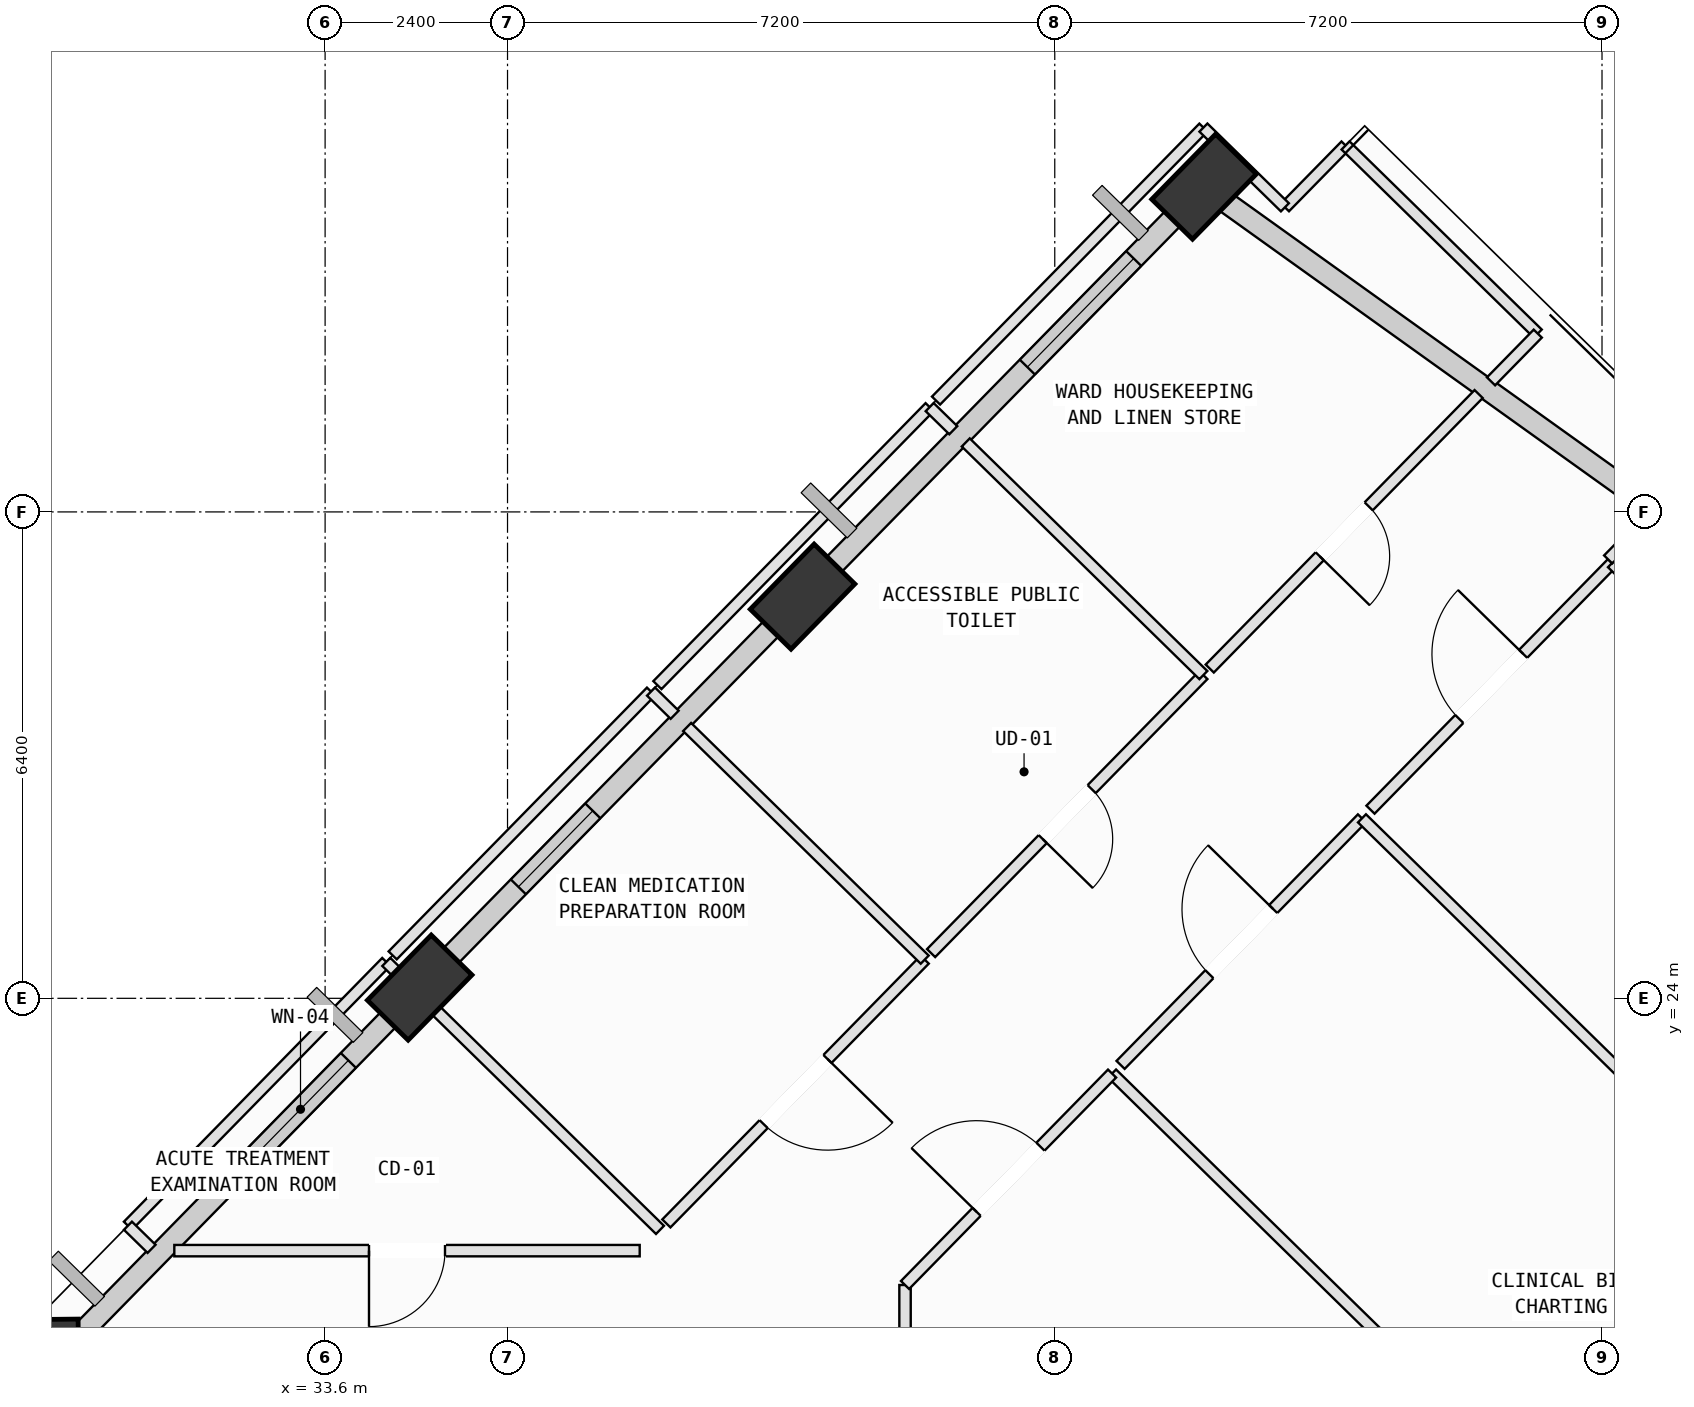
"""IFC4 building model, lengths in metres.
Left out: names, types, materials, properties, quantities, classifications, styles, units other than length and angle.
Written with IfcOpenShell. Run it as: python <this file> out.ifc"""

import sys

from ifc_helpers import new_model, si_unit, direction, frame, frame_2d, origin, origin_2d, place, context, subcontext, project, spatial, rectangle, extrude, element, fill, save


model = new_model("IFC4")
c1 = context("Model", 3, precision=1e-05, world=origin(), true_north=direction((0.0, 1.0)))
c2 = subcontext(c1, "Body", "Model", "MODEL_VIEW")
j1 = project(units=[si_unit("LENGTHUNIT", "METRE"), si_unit("PLANEANGLEUNIT", "RADIAN")], contexts=[c1])
p1 = place(None, origin())
s1 = spatial("IfcSite", under=j1, at=p1, CompositionType="ELEMENT")
p2 = place(p1, origin())
s2 = spatial("IfcBuilding", under=s1, at=p2, CompositionType="ELEMENT")
p3 = place(p2, frame((0.0, 0.0, 219.2)))
s3 = spatial("IfcBuildingStorey", under=s2, at=p3, CompositionType="ELEMENT", Elevation=219.2)
p4 = place(p3, frame((45.164, 34.68, 0.002), z_axis=(-0.041276583012, 0.047556476735, 0.998015343176), x_axis=(-0.060997101317, -0.997123434669, 0.044991217634)))
e1 = element("IfcColumn", 1, at=p4, inside=s3, PredefinedType="COLUMN", context=c2, shape_type="SweptSolid", body=[
    extrude(rectangle(XDim=1.2, YDim=0.75, at=origin_2d()), origin(), (0.0, 0.0, 1.0), 4.004),
])
p5 = place(p3, frame((39.882, 29.285, 0.002), z_axis=(-0.018745380702, 0.025889385725, 0.999489044667), x_axis=(-0.147908439225, -0.988737361944, 0.022836871563)))
e2 = element("IfcColumn", 2, at=p5, inside=s3, PredefinedType="COLUMN", context=c2, shape_type="SweptSolid", body=[
    extrude(rectangle(XDim=1.2, YDim=0.75, at=origin_2d()), origin(), (0.0, 0.0, 1.0), 3.998),
])
p6 = place(p3, frame((34.844, 24.141, 0.002), z_axis=(0.002687962717, 0.005131565187, 0.999983220807), x_axis=(-0.951298609313, -0.30824312721, 0.004138894343)))
e3 = element("IfcColumn", 3, at=p6, inside=s3, PredefinedType="COLUMN", context=c2, shape_type="SweptSolid", body=[
    extrude(rectangle(XDim=1.2, YDim=0.75, at=origin_2d()), origin(), (0.0, 0.0, 1.0), 3.996),
])
p7 = place(p3, frame((29.982, 19.176, 0.002), z_axis=(0.023449963828, -0.014778362621, 0.999615775783), x_axis=(-0.851223767602, 0.524070492315, 0.027716719769)))
e4 = element("IfcColumn", 4, at=p7, inside=s3, PredefinedType="COLUMN", context=c2, shape_type="SweptSolid", body=[
    extrude(rectangle(XDim=1.2, YDim=0.75, at=origin_2d()), origin(), (0.0, 0.0, 1.0), 3.998),
])
p8 = place(p3, frame((45.387, 34.52, 0.0), z_axis=(0.0, 0.0, 1.0), x_axis=(0.812998955019, -0.582265145048, 0.0)))
e5 = element("IfcWall", 5, at=p8, inside=s3, PredefinedType="SOLIDWALL", context=c2, shape_type="SweptSolid", body=[
    extrude(rectangle(XDim=9.036, YDim=0.28, at=frame_2d((4.518, 0.0))), origin(), (0.0, 0.0, 1.0), 3.265),
])
p9 = place(p3, frame((40.164, 29.573, 0.0), z_axis=(0.0, 0.0, 1.0), x_axis=(0.699668069964, 0.714468048181, 0.0)))
e6 = element("IfcWall", 6, at=p9, inside=s3, PredefinedType="SOLIDWALL", context=c2, shape_type="SweptSolid", body=[
    extrude(rectangle(XDim=6.78, YDim=0.28, at=frame_2d((3.39, 0.0))), origin(), (0.0, 0.0, 1.0), 3.165),
])
p10 = place(p9, frame((3.824, 0.0, 0.75)))
e7 = element("IfcOpeningElement", 7, at=p10, cuts=e6, PredefinedType="OPENING", context=c2, shape_type="SweptSolid", body=[
    extrude(rectangle(XDim=2.0, YDim=1.95, at=frame_2d((1.0, 0.975))), frame((0.0, 0.15, 0.0), z_axis=(0.0, -1.0, 0.0), x_axis=(1.0, 0.0, 0.0)), (0.0, 0.0, 1.0), 0.3),
])
p11 = place(p3, frame((35.13, 24.433, 0.0), z_axis=(0.0, 0.0, 1.0), x_axis=(0.699640187186, 0.714495352311, 0.0)))
e8 = element("IfcWall", 8, at=p11, inside=s3, PredefinedType="SOLIDWALL", context=c2, shape_type="SweptSolid", body=[
    extrude(rectangle(XDim=6.409, YDim=0.28, at=frame_2d((3.205, 0.0))), origin(), (0.0, 0.0, 1.0), 3.265),
])
p12 = place(p11, frame((1.447, 0.0, 0.75)))
e9 = element("IfcOpeningElement", 9, at=p12, cuts=e8, PredefinedType="OPENING", context=c2, shape_type="SweptSolid", body=[
    extrude(rectangle(XDim=1.4, YDim=1.85, at=frame_2d((0.7, 0.925))), frame((0.0, 0.15, 0.0), z_axis=(0.0, -1.0, 0.0), x_axis=(1.0, 0.0, 0.0)), (0.0, 0.0, 1.0), 0.3),
])
p13 = place(p3, frame((30.265, 19.465, 0.0), z_axis=(0.0, 0.0, 1.0), x_axis=(0.699674545586, 0.714461706643, 0.0)))
e10 = element("IfcWall", 10, at=p13, inside=s3, PredefinedType="SOLIDWALL", context=c2, shape_type="SweptSolid", body=[
    extrude(rectangle(XDim=6.158, YDim=0.28, at=frame_2d((3.079, 0.0))), origin(), (0.0, 0.0, 1.0), 3.165),
])
p14 = place(p13, frame((3.403, 0.0, 0.75)))
e11 = element("IfcOpeningElement", 11, at=p14, cuts=e10, PredefinedType="OPENING", context=c2, shape_type="SweptSolid", body=[
    extrude(rectangle(XDim=1.8, YDim=2.05, at=frame_2d((0.9, 1.025))), frame((0.0, 0.15, 0.0), z_axis=(0.0, -1.0, 0.0), x_axis=(1.0, 0.0, 0.0)), (0.0, 0.0, 1.0), 0.3),
])
p15 = place(p3, frame((43.954, 23.01, 0.0), z_axis=(0.0, 0.0, 1.0), x_axis=(0.714437262996, -0.699699504961, 0.0)))
e12 = element("IfcWall", 12, at=p15, inside=s3, PredefinedType="PARTITIONING", context=c2, shape_type="SweptSolid", body=[
    extrude(rectangle(XDim=13.484, YDim=0.15, at=frame_2d((6.742, 0.0))), origin(), (0.0, 0.0, 1.0), 3.415),
])
p16 = place(p3, frame((41.23, 19.274, 0.0), z_axis=(0.0, 0.0, 1.0), x_axis=(0.0, 1.0, 0.0)))
e13 = element("IfcWall", 13, at=p16, inside=s3, PredefinedType="PARTITIONING", context=c2, shape_type="SweptSolid", body=[
    extrude(rectangle(XDim=0.954, YDim=0.15, at=frame_2d((0.477, 0.0))), origin(), (0.0, 0.0, 1.0), 3.78),
])
p17 = place(p3, frame((41.23, 20.228, 0.0), z_axis=(0.0, 0.0, 1.0), x_axis=(0.699637463653, 0.714498019209, 0.0)))
e14 = element("IfcWall", 14, at=p17, inside=s3, PredefinedType="PARTITIONING", context=c2, shape_type="SweptSolid", body=[
    extrude(rectangle(XDim=3.894, YDim=0.15, at=frame_2d((1.947, 0.0))), origin(), (0.0, 0.0, 1.0), 3.78),
])
p18 = place(p17, frame((1.347, 0.0, 0.0)))
e15 = element("IfcOpeningElement", 15, at=p18, cuts=e14, PredefinedType="OPENING", context=c2, shape_type="SweptSolid", body=[
    extrude(rectangle(XDim=1.2, YDim=2.15, at=frame_2d((0.6, 1.075))), frame((0.0, 0.085, 0.0), z_axis=(0.0, -1.0, 0.0), x_axis=(1.0, 0.0, 0.0)), (0.0, 0.0, 1.0), 0.17),
])
p19 = place(p3, frame((44.066, 23.124, 0.0), z_axis=(0.0, 0.0, 1.0), x_axis=(0.699592189313, 0.714542349097, 0.0)))
e16 = element("IfcWall", 16, at=p19, inside=s3, PredefinedType="PARTITIONING", context=c2, shape_type="SweptSolid", body=[
    extrude(rectangle(XDim=4.54, YDim=0.15, at=frame_2d((2.27, 0.0))), origin(), (0.0, 0.0, 1.0), 3.78),
])
p20 = place(p19, frame((1.67, 0.0, 0.0)))
e17 = element("IfcOpeningElement", 17, at=p20, cuts=e16, PredefinedType="OPENING", context=c2, shape_type="SweptSolid", body=[
    extrude(rectangle(XDim=1.2, YDim=2.15, at=frame_2d((0.6, 1.075))), frame((0.0, 0.085, 0.0), z_axis=(0.0, -1.0, 0.0), x_axis=(1.0, 0.0, 0.0)), (0.0, 0.0, 1.0), 0.17),
])
p21 = place(p3, frame((47.242, 26.368, 0.0), z_axis=(0.0, 0.0, 1.0), x_axis=(0.714409925355, -0.699727417323, 0.0)))
e18 = element("IfcWall", 18, at=p21, inside=s3, PredefinedType="PARTITIONING", context=c2, shape_type="SweptSolid", body=[
    extrude(rectangle(XDim=13.485, YDim=0.15, at=frame_2d((6.743, 0.0))), origin(), (0.0, 0.0, 1.0), 3.78),
])
p22 = place(p3, frame((47.354, 26.482, 0.0), z_axis=(0.0, 0.0, 1.0), x_axis=(0.699675115153, 0.714461148863, 0.0)))
e19 = element("IfcWall", 19, at=p22, inside=s3, PredefinedType="PARTITIONING", context=c2, shape_type="SweptSolid", body=[
    extrude(rectangle(XDim=4.541, YDim=0.15, at=frame_2d((2.271, 0.0))), origin(), (0.0, 0.0, 1.0), 3.78),
])
p23 = place(p22, frame((1.67, 0.0, 0.0)))
e20 = element("IfcOpeningElement", 20, at=p23, cuts=e19, PredefinedType="OPENING", context=c2, shape_type="SweptSolid", body=[
    extrude(rectangle(XDim=1.2, YDim=2.15, at=frame_2d((0.6, 1.075))), frame((0.0, 0.085, 0.0), z_axis=(0.0, -1.0, 0.0), x_axis=(1.0, 0.0, 0.0)), (0.0, 0.0, 1.0), 0.17),
])
p24 = place(p3, frame((50.531, 29.726, 0.0), z_axis=(0.0, 0.0, 1.0), x_axis=(0.714431068807, -0.699705829563, 0.0)))
e21 = element("IfcWall", 21, at=p24, inside=s3, PredefinedType="PARTITIONING", context=c2, shape_type="SweptSolid", body=[
    extrude(rectangle(XDim=10.926, YDim=0.15, at=frame_2d((5.463, 0.0))), origin(), (0.0, 0.0, 1.0), 3.78),
])
p25 = place(p3, frame((31.006, 21.008, 0.0), z_axis=(0.0, 0.0, 1.0), x_axis=(0.699655259221, 0.71448059333, 0.0)))
e22 = element("IfcWall", 22, at=p25, inside=s3, PredefinedType="PARTITIONING", context=c2, shape_type="SweptSolid", body=[
    extrude(rectangle(XDim=4.858, YDim=0.15, at=frame_2d((2.429, 0.0))), origin(), (0.0, 0.0, 1.0), 3.78),
])
p26 = place(p3, frame((34.405, 24.479, 0.0), z_axis=(0.0, 0.0, 1.0), x_axis=(0.714503363724, -0.699632005577, 0.0)))
e23 = element("IfcWall", 23, at=p26, inside=s3, PredefinedType="PARTITIONING", context=c2, shape_type="SweptSolid", body=[
    extrude(rectangle(XDim=5.04, YDim=0.15, at=frame_2d((2.52, 0.0))), origin(), (0.0, 0.0, 1.0), 3.78),
])
p27 = place(p3, frame((37.739, 20.68, 0.0), z_axis=(0.0, 0.0, 1.0), x_axis=(-1.0, 0.0, 0.0)))
e24 = element("IfcWall", 24, at=p27, inside=s3, PredefinedType="PARTITIONING", context=c2, shape_type="SweptSolid", body=[
    extrude(rectangle(XDim=6.123, YDim=0.15, at=frame_2d((3.062, 0.0))), origin(), (0.0, 0.0, 1.0), 3.78),
])
p28 = place(p27, frame((2.562, 0.0, 0.0)))
e25 = element("IfcOpeningElement", 25, at=p28, cuts=e24, PredefinedType="OPENING", context=c2, shape_type="SweptSolid", body=[
    extrude(rectangle(XDim=1.0, YDim=2.12, at=frame_2d((0.5, 1.06))), frame((0.0, 0.085, 0.0), z_axis=(0.0, -1.0, 0.0), x_axis=(1.0, 0.0, 0.0)), (0.0, 0.0, 1.0), 0.17),
])
p29 = place(p3, frame((31.317, 20.704, 0.0), z_axis=(0.0, 0.0, 1.0), x_axis=(-0.714925563688, 0.699200570928, 0.0)))
e26 = element("IfcWall", 26, at=p29, inside=s3, PredefinedType="PARTITIONING", context=c2, shape_type="SweptSolid", body=[
    extrude(rectangle(XDim=0.435, YDim=0.15, at=frame_2d((0.217, 0.0))), origin(), (0.0, 0.0, 1.0), 3.78),
])
p30 = place(p3, frame((41.489, 24.509, 0.0), z_axis=(0.0, 0.0, 1.0), x_axis=(-0.699655259221, -0.71448059333, 0.0)))
e27 = element("IfcWall", 27, at=p30, inside=s3, PredefinedType="PARTITIONING", context=c2, shape_type="SweptSolid", body=[
    extrude(rectangle(XDim=4.858, YDim=0.15, at=frame_2d((2.429, 0.0))), origin(), (0.0, 0.0, 1.0), 3.165),
])
p31 = place(p30, frame((1.829, 0.0, 0.0)))
e28 = element("IfcOpeningElement", 28, at=p31, cuts=e27, PredefinedType="OPENING", context=c2, shape_type="SweptSolid", body=[
    extrude(rectangle(XDim=1.2, YDim=2.15, at=frame_2d((0.6, 1.075))), frame((0.0, 0.085, 0.0), z_axis=(0.0, -1.0, 0.0), x_axis=(1.0, 0.0, 0.0)), (0.0, 0.0, 1.0), 0.17),
])
p32 = place(p3, frame((34.489, 24.565, 0.0), z_axis=(0.0, 0.0, 1.0), x_axis=(0.699655259221, 0.71448059333, 0.0)))
e29 = element("IfcWall", 29, at=p32, inside=s3, PredefinedType="PARTITIONING", context=c2, shape_type="SweptSolid", body=[
    extrude(rectangle(XDim=4.858, YDim=0.15, at=frame_2d((2.429, 0.0))), origin(), (0.0, 0.0, 1.0), 3.78),
])
p33 = place(p3, frame((37.888, 28.036, 0.0), z_axis=(0.0, 0.0, 1.0), x_axis=(0.714078333154, -0.700065806993, 0.0)))
e30 = element("IfcWall", 30, at=p33, inside=s3, PredefinedType="PARTITIONING", context=c2, shape_type="SweptSolid", body=[
    extrude(rectangle(XDim=0.436, YDim=0.15, at=frame_2d((0.218, 0.0))), origin(), (0.0, 0.0, 1.0), 3.78),
])
p34 = place(p3, frame((38.363, 27.57, 0.0), z_axis=(0.0, 0.0, 1.0), x_axis=(0.71448950504, -0.69964615856, 0.0)))
e31 = element("IfcWall", 31, at=p34, inside=s3, PredefinedType="PARTITIONING", context=c2, shape_type="SweptSolid", body=[
    extrude(rectangle(XDim=4.375, YDim=0.15, at=frame_2d((2.188, 0.0))), origin(), (0.0, 0.0, 1.0), 3.415),
])
p35 = place(p3, frame((45.155, 28.253, 0.0), z_axis=(0.0, 0.0, 1.0), x_axis=(-0.699652687423, -0.714483111754, 0.0)))
e32 = element("IfcWall", 32, at=p35, inside=s3, PredefinedType="PARTITIONING", context=c2, shape_type="SweptSolid", body=[
    extrude(rectangle(XDim=5.12, YDim=0.15, at=frame_2d((2.56, 0.0))), origin(), (0.0, 0.0, 1.0), 3.78),
])
p36 = place(p35, frame((2.1, 0.0, 0.0)))
e33 = element("IfcOpeningElement", 33, at=p36, cuts=e32, PredefinedType="OPENING", context=c2, shape_type="SweptSolid", body=[
    extrude(rectangle(XDim=0.92, YDim=2.1, at=frame_2d((0.46, 1.05))), frame((0.0, 0.085, 0.0), z_axis=(0.0, -1.0, 0.0), x_axis=(1.0, 0.0, 0.0)), (0.0, 0.0, 1.0), 0.17),
])
p37 = place(p3, frame((37.972, 28.121, 0.0), z_axis=(0.0, 0.0, 1.0), x_axis=(0.699652687423, 0.714483111754, 0.0)))
e34 = element("IfcWall", 34, at=p37, inside=s3, PredefinedType="PARTITIONING", context=c2, shape_type="SweptSolid", body=[
    extrude(rectangle(XDim=5.12, YDim=0.15, at=frame_2d((2.56, 0.0))), origin(), (0.0, 0.0, 1.0), 3.265),
])
p38 = place(p3, frame((41.554, 31.779, 0.0), z_axis=(0.0, 0.0, 1.0), x_axis=(0.71519995758, -0.698919895751, 0.0)))
e35 = element("IfcWall", 35, at=p38, inside=s3, PredefinedType="PARTITIONING", context=c2, shape_type="SweptSolid", body=[
    extrude(rectangle(XDim=0.435, YDim=0.15, at=frame_2d((0.217, 0.0))), origin(), (0.0, 0.0, 1.0), 3.78),
])
p39 = place(p3, frame((42.029, 31.314, 0.0), z_axis=(0.0, 0.0, 1.0), x_axis=(0.71448950504, -0.69964615856, 0.0)))
e36 = element("IfcWall", 36, at=p39, inside=s3, PredefinedType="PARTITIONING", context=c2, shape_type="SweptSolid", body=[
    extrude(rectangle(XDim=4.375, YDim=0.15, at=frame_2d((2.188, 0.0))), origin(), (0.0, 0.0, 1.0), 3.78),
])
p40 = place(p3, frame((46.228, 34.408, 0.0), z_axis=(0.0, 0.0, 1.0), x_axis=(0.700002877406, 0.714140022421, 0.0)))
e37 = element("IfcWall", 37, at=p40, inside=s3, PredefinedType="PARTITIONING", context=c2, shape_type="SweptSolid", body=[
    extrude(rectangle(XDim=1.14, YDim=0.15, at=frame_2d((0.57, 0.0))), origin(), (0.0, 0.0, 1.0), 3.78),
])
p41 = place(p3, frame((47.026, 35.222, 0.0), z_axis=(0.0, 0.0, 1.0), x_axis=(0.714585854824, -0.699547751112, 0.0)))
e38 = element("IfcWall", 38, at=p41, inside=s3, PredefinedType="PARTITIONING", context=c2, shape_type="SweptSolid", body=[
    extrude(rectangle(XDim=3.539, YDim=0.15, at=frame_2d((1.77, 0.0))), origin(), (0.0, 0.0, 1.0), 3.78),
])
p42 = place(p3, frame((49.555, 32.746, 0.0), z_axis=(0.0, 0.0, 1.0), x_axis=(-0.699568668638, -0.714565376897, 0.0)))
e39 = element("IfcWall", 39, at=p42, inside=s3, PredefinedType="PARTITIONING", context=c2, shape_type="SweptSolid", body=[
    extrude(rectangle(XDim=0.879, YDim=0.15, at=frame_2d((0.439, 0.0))), origin(), (0.0, 0.0, 1.0), 3.78),
])
p43 = place(p3, frame((48.777, 31.951, 0.0), z_axis=(0.0, 0.0, 1.0), x_axis=(-0.699777823275, -0.714360551859, 0.0)))
e40 = element("IfcWall", 40, at=p43, inside=s3, PredefinedType="PARTITIONING", context=c2, shape_type="SweptSolid", body=[
    extrude(rectangle(XDim=5.056, YDim=0.15, at=frame_2d((2.528, 0.0))), origin(), (0.0, 0.0, 1.0), 3.78),
])
p44 = place(p43, frame((2.068, 0.0, 0.0)))
e41 = element("IfcOpeningElement", 41, at=p44, cuts=e40, PredefinedType="OPENING", context=c2, shape_type="SweptSolid", body=[
    extrude(rectangle(XDim=0.92, YDim=2.1, at=frame_2d((0.46, 1.05))), frame((0.0, 0.085, 0.0), z_axis=(0.0, -1.0, 0.0), x_axis=(1.0, 0.0, 0.0)), (0.0, 0.0, 1.0), 0.17),
])
p45 = place(p3, frame((41.638, 31.865, 0.0), z_axis=(0.0, 0.0, 1.0), x_axis=(0.699712068042, 0.714424958856, 0.0)))
e42 = element("IfcWall", 42, at=p45, inside=s3, PredefinedType="PARTITIONING", context=c2, shape_type="SweptSolid", body=[
    extrude(rectangle(XDim=5.028, YDim=0.15, at=frame_2d((2.514, 0.0))), origin(), (0.0, 0.0, 1.0), 3.165),
])
p46 = place(p3, frame((45.156, 35.457, 0.0), z_axis=(0.0, 0.0, 1.0), x_axis=(0.714715506178, -0.6994152881, 0.0)))
e43 = element("IfcWall", 43, at=p46, inside=s3, PredefinedType="PARTITIONING", context=c2, shape_type="SweptSolid", body=[
    extrude(rectangle(XDim=1.5, YDim=0.15, at=frame_2d((0.75, 0.0))), origin(), (0.0, 0.0, 1.0), 3.265),
])
p47 = place(p3, frame((50.481, 29.775, 0.0), z_axis=(0.0, 0.0, 1.0), x_axis=(0.699459673808, 0.714672067956, 0.0)))
e44 = element("IfcWall", 44, at=p47, inside=s3, PredefinedType="PARTITIONING", context=c2, shape_type="SweptSolid", body=[
    extrude(rectangle(XDim=0.786, YDim=0.15, at=frame_2d((0.393, 0.0))), origin(), (0.0, 0.0, 1.0), 3.78),
])
p48 = place(p10, origin())
e45 = element("IfcWindow", 45, at=p48, inside=s3, PartitioningType="SINGLE_PANEL", PredefinedType="WINDOW", context=c2, shape_type="SweptSolid", body=[
    extrude(rectangle(XDim=2.0, YDim=1.95, at=frame_2d((1.0, 0.975))), frame((0.0, 0.03, 0.0), z_axis=(0.0, -1.0, 0.0), x_axis=(1.0, 0.0, 0.0)), (0.0, 0.0, 1.0), 0.06),
])
fill(e7, e45)
p49 = place(p12, origin())
e46 = element("IfcWindow", 46, at=p49, inside=s3, PartitioningType="SINGLE_PANEL", PredefinedType="WINDOW", context=c2, shape_type="SweptSolid", body=[
    extrude(rectangle(XDim=1.4, YDim=1.85, at=frame_2d((0.7, 0.925))), frame((0.0, 0.03, 0.0), z_axis=(0.0, -1.0, 0.0), x_axis=(1.0, 0.0, 0.0)), (0.0, 0.0, 1.0), 0.06),
])
fill(e9, e46)
p50 = place(p14, origin())
e47 = element("IfcWindow", 47, at=p50, inside=s3, PartitioningType="SINGLE_PANEL", PredefinedType="WINDOW", context=c2, shape_type="SweptSolid", body=[
    extrude(rectangle(XDim=1.8, YDim=2.05, at=frame_2d((0.9, 1.025))), frame((0.0, 0.03, 0.0), z_axis=(0.0, -1.0, 0.0), x_axis=(1.0, 0.0, 0.0)), (0.0, 0.0, 1.0), 0.06),
])
fill(e11, e47)
p51 = place(p18, origin())
e48 = element("IfcDoor", 48, at=p51, inside=s3, OperationType="SINGLE_SWING_LEFT", PredefinedType="DOOR", context=c2, shape_type="SweptSolid", body=[
    extrude(rectangle(XDim=1.2, YDim=2.15, at=frame_2d((0.6, 1.075))), frame((0.0, 0.025, 0.0), z_axis=(0.0, -1.0, 0.0), x_axis=(1.0, 0.0, 0.0)), (0.0, 0.0, 1.0), 0.05),
])
fill(e15, e48)
p52 = place(p20, origin())
e49 = element("IfcDoor", 49, at=p52, inside=s3, OperationType="SINGLE_SWING_RIGHT", PredefinedType="DOOR", context=c2, shape_type="SweptSolid", body=[
    extrude(rectangle(XDim=1.2, YDim=2.15, at=frame_2d((0.6, 1.075))), frame((0.0, 0.025, 0.0), z_axis=(0.0, -1.0, 0.0), x_axis=(1.0, 0.0, 0.0)), (0.0, 0.0, 1.0), 0.05),
])
fill(e17, e49)
p53 = place(p23, origin())
e50 = element("IfcDoor", 50, at=p53, inside=s3, OperationType="SINGLE_SWING_RIGHT", PredefinedType="DOOR", context=c2, shape_type="SweptSolid", body=[
    extrude(rectangle(XDim=1.2, YDim=2.15, at=frame_2d((0.6, 1.075))), frame((0.0, 0.025, 0.0), z_axis=(0.0, -1.0, 0.0), x_axis=(1.0, 0.0, 0.0)), (0.0, 0.0, 1.0), 0.05),
])
fill(e20, e50)
p54 = place(p28, origin())
e51 = element("IfcDoor", 51, at=p54, inside=s3, OperationType="SINGLE_SWING_RIGHT", PredefinedType="DOOR", context=c2, shape_type="SweptSolid", body=[
    extrude(rectangle(XDim=1.0, YDim=2.12, at=frame_2d((0.5, 1.06))), frame((0.0, 0.025, 0.0), z_axis=(0.0, -1.0, 0.0), x_axis=(1.0, 0.0, 0.0)), (0.0, 0.0, 1.0), 0.05),
])
fill(e25, e51)
p55 = place(p31, origin())
e52 = element("IfcDoor", 52, at=p55, inside=s3, OperationType="SINGLE_SWING_LEFT", PredefinedType="DOOR", context=c2, shape_type="SweptSolid", body=[
    extrude(rectangle(XDim=1.2, YDim=2.15, at=frame_2d((0.6, 1.075))), frame((0.0, 0.025, 0.0), z_axis=(0.0, -1.0, 0.0), x_axis=(1.0, 0.0, 0.0)), (0.0, 0.0, 1.0), 0.05),
])
fill(e28, e52)
p56 = place(p36, origin())
e53 = element("IfcDoor", 53, at=p56, inside=s3, OperationType="SINGLE_SWING_RIGHT", PredefinedType="DOOR", context=c2, shape_type="SweptSolid", body=[
    extrude(rectangle(XDim=0.92, YDim=2.1, at=frame_2d((0.46, 1.05))), frame((0.0, 0.025, 0.0), z_axis=(0.0, -1.0, 0.0), x_axis=(1.0, 0.0, 0.0)), (0.0, 0.0, 1.0), 0.05),
])
fill(e33, e53)
p57 = place(p44, origin())
e54 = element("IfcDoor", 54, at=p57, inside=s3, OperationType="SINGLE_SWING_RIGHT", PredefinedType="DOOR", context=c2, shape_type="SweptSolid", body=[
    extrude(rectangle(XDim=0.92, YDim=2.1, at=frame_2d((0.46, 1.05))), frame((0.0, 0.025, 0.0), z_axis=(0.0, -1.0, 0.0), x_axis=(1.0, 0.0, 0.0)), (0.0, 0.0, 1.0), 0.05),
])
fill(e41, e54)
save(model, sys.argv[1])
